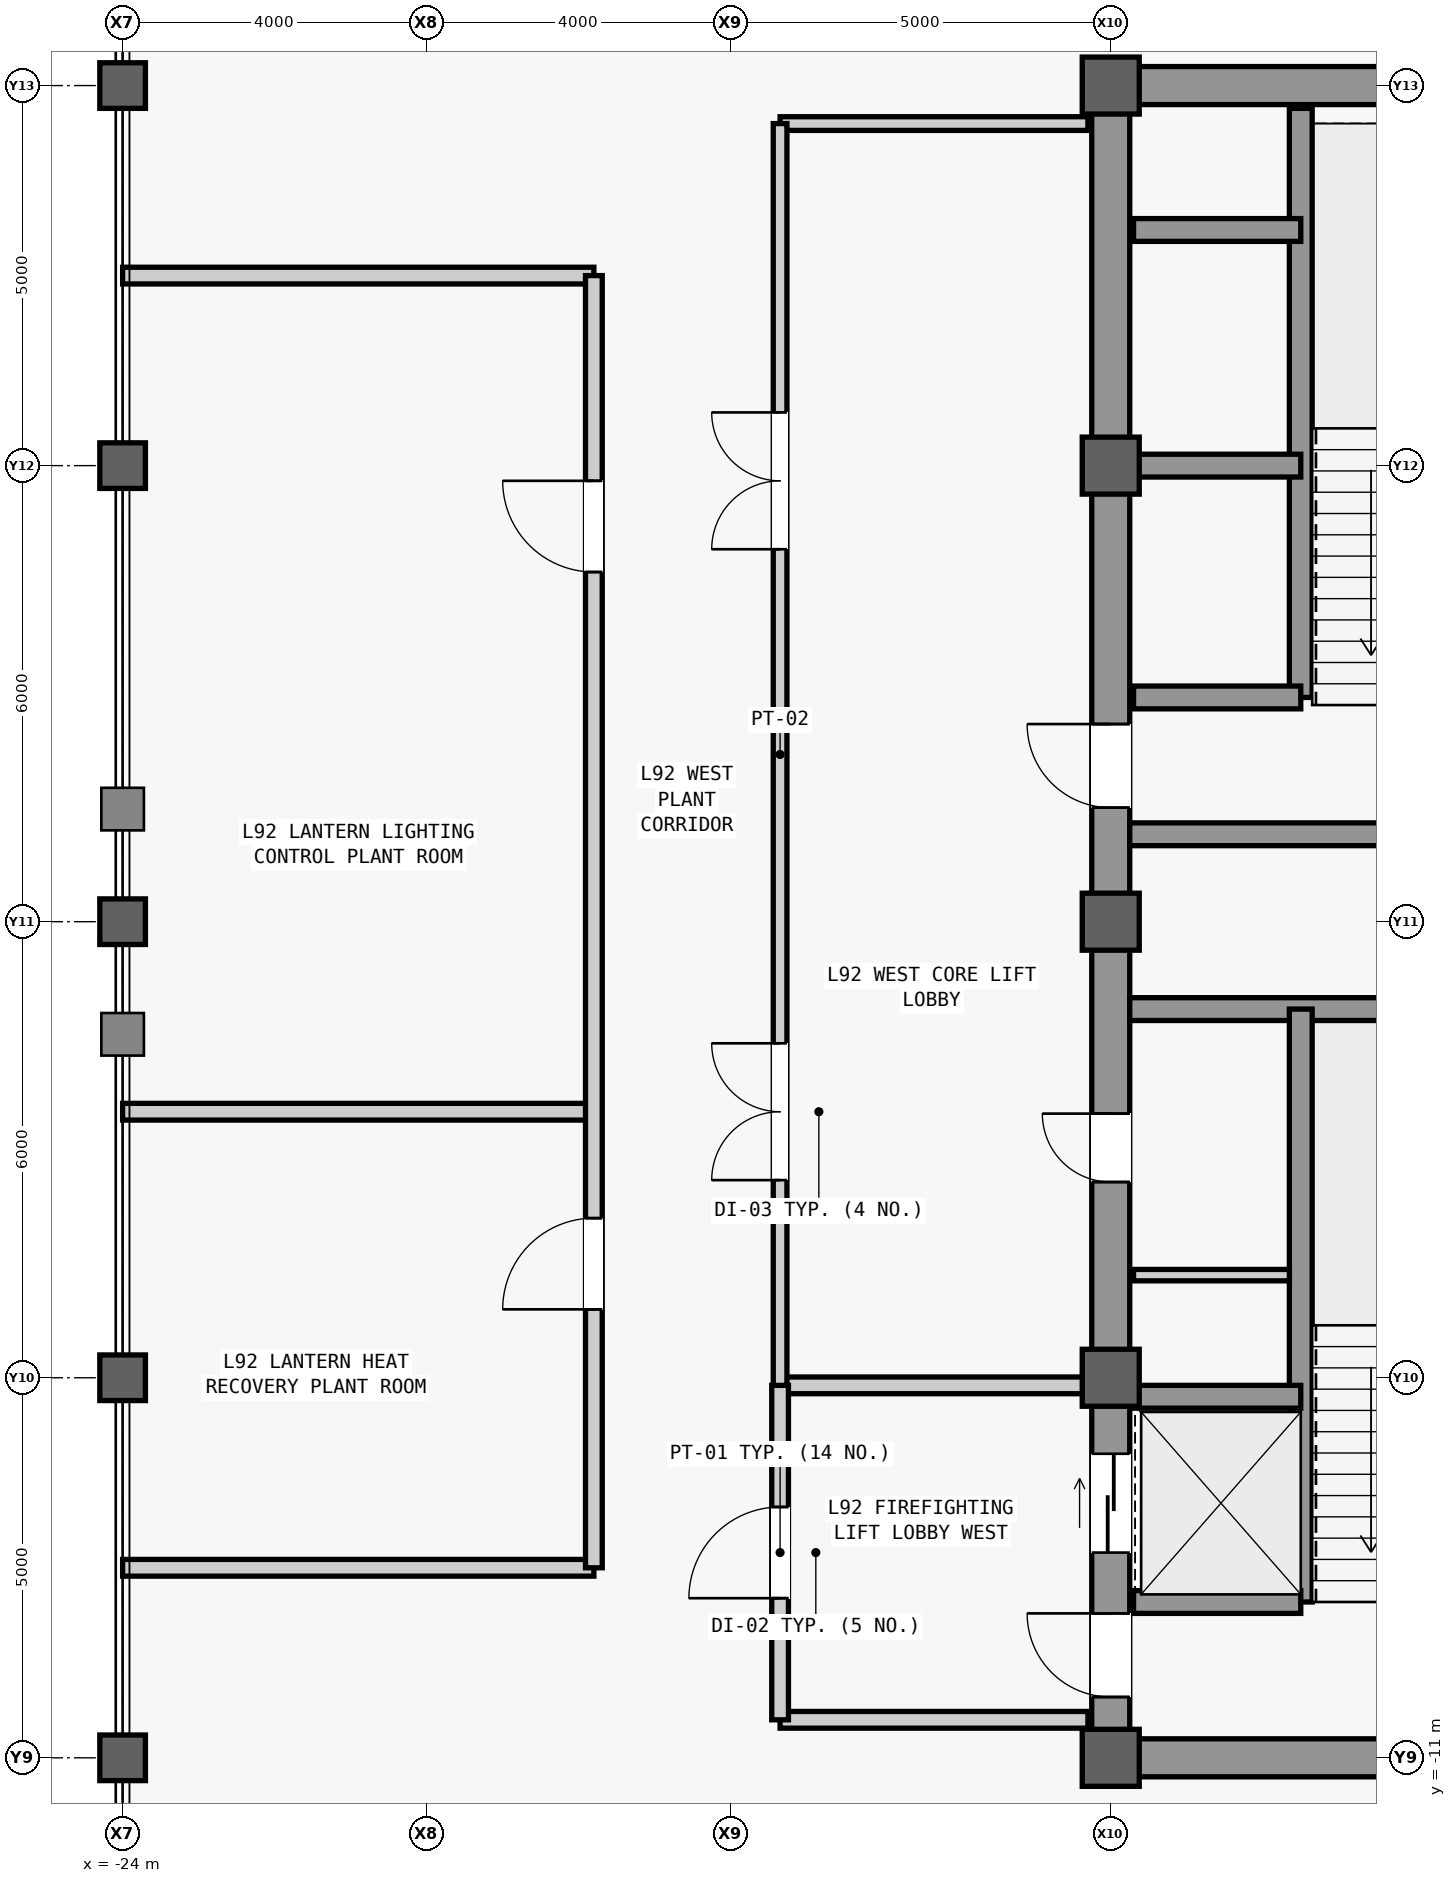
"""IFC4 building model, lengths in metres.
Left out: names, types, materials, properties, quantities, classifications, styles, units other than length and angle.
Written with IfcOpenShell. Run it as: python <this file> out.ifc"""

import sys

from ifc_helpers import new_model, si_unit, direction, frame, frame_2d, origin, origin_2d, place, context, subcontext, project, spatial, rectangle, hollow_rectangle, extrude, source, transform, mapped, element, fill, save


model = new_model("IFC4")
c1 = context("Model", 3, precision=1e-05, world=origin(), true_north=direction((0.0, 1.0)))
c2 = subcontext(c1, "Body", "Model", "MODEL_VIEW")
j1 = project(units=[si_unit("LENGTHUNIT", "METRE"), si_unit("PLANEANGLEUNIT", "RADIAN")], contexts=[c1])
p1 = place(None, origin())
s1 = spatial("IfcSite", under=j1, at=p1, CompositionType="ELEMENT")
p2 = place(p1, origin())
s2 = spatial("IfcBuilding", under=s1, at=p2, CompositionType="ELEMENT")
p3 = place(p2, frame((0.0, 0.0, 389.9)))
s3 = spatial("IfcBuildingStorey", under=s2, at=p3, CompositionType="ELEMENT", Elevation=389.9)
m1 = source(origin(), c2, "Body", "SweptSolid", [
    extrude(rectangle(XDim=22.0, YDim=0.5, at=frame_2d((11.0, 0.0))), origin(), (0.0, 0.0, 1.0), 4.45),
])
p4 = place(p3, frame((-11.0, -11.0, 0.0), z_axis=(0.0, 0.0, 1.0), x_axis=(0.0, 1.0, 0.0)))
e1 = element("IfcWall", 1, at=p4, inside=s3, PredefinedType="SHEAR", context=c2, shape_type="MappedRepresentation", body=[
    mapped(m1, transform((0.0, 0.0, 0.0), scale=1.0)),
])
m2 = source(origin(), c2, "Body", "SweptSolid", [
    extrude(rectangle(XDim=1.1, YDim=2.2, at=frame_2d((0.55, 1.1))), frame((0.0, 0.26, 0.0), z_axis=(0.0, -1.0, 0.0), x_axis=(1.0, 0.0, 0.0)), (0.0, 0.0, 1.0), 0.52),
])
p5 = place(p4, frame((0.8, 0.0, 0.0)))
e2 = element("IfcOpeningElement", 2, at=p5, cuts=e1, PredefinedType="OPENING", context=c2, shape_type="MappedRepresentation", body=[
    mapped(m2, transform((0.0, 0.0, 0.0), scale=1.0)),
])
p6 = place(p4, frame((12.5, 0.0, 0.0)))
e3 = element("IfcOpeningElement", 3, at=p6, cuts=e1, PredefinedType="OPENING", context=c2, shape_type="MappedRepresentation", body=[
    mapped(m2, transform((0.0, 0.0, 0.0), scale=1.0)),
])
m3 = source(origin(), c2, "Body", "SweptSolid", [
    extrude(rectangle(XDim=0.9, YDim=2.15, at=frame_2d((0.45, 1.075))), frame((0.0, 0.26, 0.0), z_axis=(0.0, -1.0, 0.0), x_axis=(1.0, 0.0, 0.0)), (0.0, 0.0, 1.0), 0.52),
])
p7 = place(p4, frame((7.575, 0.0, 0.0)))
e4 = element("IfcOpeningElement", 4, at=p7, cuts=e1, PredefinedType="OPENING", context=c2, shape_type="MappedRepresentation", body=[
    mapped(m3, transform((0.0, 0.0, 0.0), scale=1.0)),
])
m4 = source(origin(), c2, "Body", "SweptSolid", [
    extrude(rectangle(XDim=1.3, YDim=2.3, at=frame_2d((0.65, 1.15))), frame((0.0, 0.26, 0.0), z_axis=(0.0, -1.0, 0.0), x_axis=(1.0, 0.0, 0.0)), (0.0, 0.0, 1.0), 0.52),
])
p8 = place(p4, frame((2.7, 0.0, 0.0)))
e5 = element("IfcOpeningElement", 5, at=p8, cuts=e1, PredefinedType="OPENING", context=c2, shape_type="MappedRepresentation", body=[
    mapped(m4, transform((0.0, 0.0, 0.0), scale=1.0)),
])
m5 = source(origin(), c2, "Body", "SweptSolid", [
    extrude(rectangle(XDim=5.9, YDim=0.5, at=frame_2d((2.95, 0.0))), origin(), (0.0, 0.0, 1.0), 4.45),
])
for number, where, z_axis, x_axis in (
    (6, (-10.75, -11.0, 0.0), (0.0, 0.0, 1.0), (1.0, 0.0, 0.0)),
    (7, (-10.75, 11.0, 0.0), (0.0, 0.0, 1.0), (1.0, 0.0, 0.0)),
):
    element("IfcWall", number, at=place(p3, frame(where, z_axis=z_axis, x_axis=x_axis)), inside=s3, PredefinedType="SHEAR", context=c2, shape_type="MappedRepresentation", body=[
        mapped(m5, transform((0.0, 0.0, 0.0), scale=1.0)),
    ])
m6 = source(origin(), c2, "Body", "SweptSolid", [
    extrude(rectangle(XDim=5.65, YDim=0.3, at=frame_2d((2.825, 0.0))), origin(), (0.0, 0.0, 1.0), 4.45),
])
for number, where, z_axis, x_axis in (
    (8, (-10.75, -1.15, 0.0), (0.0, 0.0, 1.0), (1.0, 0.0, 0.0)),
    (9, (-10.75, 1.15, 0.0), (0.0, 0.0, 1.0), (1.0, 0.0, 0.0)),
):
    element("IfcWall", number, at=place(p3, frame(where, z_axis=z_axis, x_axis=x_axis)), inside=s3, PredefinedType="SHEAR", context=c2, shape_type="MappedRepresentation", body=[
        mapped(m6, transform((0.0, 0.0, 0.0), scale=1.0)),
    ])
m7 = source(origin(), c2, "Body", "SweptSolid", [
    extrude(hollow_rectangle(XDim=0.6, YDim=0.6, WallThickness=0.035, at=origin_2d()), origin(), (0.0, 0.0, 1.0), 4.8),
])
for number, where, z_axis, x_axis in (
    (10, (-24.0, -11.0, 0.0), (0.0, 0.0, 1.0), (1.0, 0.0, 0.0)),
    (11, (-24.0, -6.0, 0.0), (0.0, 0.0, 1.0), (1.0, 0.0, 0.0)),
    (12, (-24.0, 0.0, 0.0), (0.0, 0.0, 1.0), (1.0, 0.0, 0.0)),
    (13, (-24.0, 6.0, 0.0), (0.0, 0.0, 1.0), (1.0, 0.0, 0.0)),
    (14, (-24.0, 11.0, 0.0), (0.0, 0.0, 1.0), (1.0, 0.0, 0.0)),
):
    element("IfcColumn", number, at=place(p3, frame(where, z_axis=z_axis, x_axis=x_axis)), inside=s3, PredefinedType="COLUMN", context=c2, shape_type="MappedRepresentation", body=[
        mapped(m7, transform((0.0, 0.0, 0.0), scale=1.0)),
    ])
m8 = source(origin(), c2, "Body", "SweptSolid", [
    extrude(rectangle(XDim=0.75, YDim=0.75, at=origin_2d()), origin(), (0.0, 0.0, 1.0), 4.8),
])
for number, where, z_axis, x_axis in (
    (15, (-11.0, -11.0, 0.0), (0.0, 0.0, 1.0), (1.0, 0.0, 0.0)),
    (16, (-11.0, -6.0, 0.0), (0.0, 0.0, 1.0), (1.0, 0.0, 0.0)),
    (17, (-11.0, 0.0, 0.0), (0.0, 0.0, 1.0), (1.0, 0.0, 0.0)),
    (18, (-11.0, 6.0, 0.0), (0.0, 0.0, 1.0), (1.0, 0.0, 0.0)),
    (19, (-11.0, 11.0, 0.0), (0.0, 0.0, 1.0), (1.0, 0.0, 0.0)),
):
    element("IfcColumn", number, at=place(p3, frame(where, z_axis=z_axis, x_axis=x_axis)), inside=s3, PredefinedType="COLUMN", context=c2, shape_type="MappedRepresentation", body=[
        mapped(m8, transform((0.0, 0.0, 0.0), scale=1.0)),
    ])
m9 = source(origin(), c2, "Body", "SweptSolid", [
    extrude(rectangle(XDim=7.8, YDim=0.3, at=frame_2d((3.9, 0.0))), origin(), (0.0, 0.0, 1.0), 4.45),
])
p9 = place(p3, frame((-8.5, -8.95, 0.0), z_axis=(0.0, 0.0, 1.0), x_axis=(0.0, 1.0, 0.0)))
e20 = element("IfcWall", 20, at=p9, inside=s3, PredefinedType="SHEAR", context=c2, shape_type="MappedRepresentation", body=[
    mapped(m9, transform((0.0, 0.0, 0.0), scale=1.0)),
])
m10 = source(origin(), c2, "Body", "SweptSolid", [
    extrude(rectangle(XDim=2.2, YDim=0.3, at=frame_2d((1.1, 0.0))), origin(), (0.0, 0.0, 1.0), 4.45),
])
for number, where, z_axis, x_axis in (
    (21, (-10.7, -8.95, 0.0), (0.0, 0.0, 1.0), (1.0, 0.0, 0.0)),
    (22, (-10.7, -6.25, 0.0), (0.0, 0.0, 1.0), (1.0, 0.0, 0.0)),
):
    element("IfcWall", number, at=place(p3, frame(where, z_axis=z_axis, x_axis=x_axis)), inside=s3, PredefinedType="SHEAR", context=c2, shape_type="MappedRepresentation", body=[
        mapped(m10, transform((0.0, 0.0, 0.0), scale=1.0)),
    ])
m11 = source(origin(), c2, "Body", "SweptSolid", [
    extrude(rectangle(XDim=7.75, YDim=0.3, at=frame_2d((3.875, 0.0))), origin(), (0.0, 0.0, 1.0), 4.45),
])
p10 = place(p3, frame((-8.5, 2.95, 0.0), z_axis=(0.0, 0.0, 1.0), x_axis=(0.0, 1.0, 0.0)))
e23 = element("IfcWall", 23, at=p10, inside=s3, PredefinedType="SHEAR", context=c2, shape_type="MappedRepresentation", body=[
    mapped(m11, transform((0.0, 0.0, 0.0), scale=1.0)),
])
for number, where, z_axis, x_axis in (
    (24, (-10.7, 2.95, 0.0), (0.0, 0.0, 1.0), (1.0, 0.0, 0.0)),
    (25, (-10.7, 6.0, 0.0), (0.0, 0.0, 1.0), (1.0, 0.0, 0.0)),
    (26, (-10.7, 9.1, 0.0), (0.0, 0.0, 1.0), (1.0, 0.0, 0.0)),
):
    element("IfcWall", number, at=place(p3, frame(where, z_axis=z_axis, x_axis=x_axis)), inside=s3, PredefinedType="SHEAR", context=c2, shape_type="MappedRepresentation", body=[
        mapped(m10, transform((0.0, 0.0, 0.0), scale=1.0)),
    ])
m12 = source(origin(), c2, "Body", "SweptSolid", [
    extrude(rectangle(XDim=2.05, YDim=0.15, at=frame_2d((1.025, 0.0))), origin(), (0.0, 0.0, 1.0), 4.45),
])
p11 = place(p3, frame((-10.7, -4.65, 0.0), z_axis=(0.0, 0.0, 1.0), x_axis=(1.0, 0.0, 0.0)))
e27 = element("IfcWall", 27, at=p11, inside=s3, PredefinedType="PARTITIONING", context=c2, shape_type="MappedRepresentation", body=[
    mapped(m12, transform((0.0, 0.0, 0.0), scale=1.0)),
])
m13 = source(origin(), c2, "Body", "SweptSolid", [
    extrude(rectangle(XDim=4.05, YDim=0.22, at=frame_2d((2.025, 0.0))), origin(), (0.0, 0.0, 1.0), 4.45),
])
p12 = place(p3, frame((-15.35, -10.5, 0.0), z_axis=(0.0, 0.0, 1.0), x_axis=(1.0, 0.0, 0.0)))
e28 = element("IfcWall", 28, at=p12, inside=s3, PredefinedType="PARTITIONING", context=c2, shape_type="MappedRepresentation", body=[
    mapped(m13, transform((0.0, 0.0, 0.0), scale=1.0)),
])
m14 = source(origin(), c2, "Body", "SweptSolid", [
    extrude(rectangle(XDim=4.05, YDim=0.22, at=frame_2d((2.025, 0.0))), origin(), (0.0, 0.0, 1.0), 3.901),
])
p13 = place(p3, frame((-15.35, -6.1, 0.0), z_axis=(0.0, 0.0, 1.0), x_axis=(1.0, 0.0, 0.0)))
e29 = element("IfcWall", 29, at=p13, inside=s3, PredefinedType="PARTITIONING", context=c2, shape_type="MappedRepresentation", body=[
    mapped(m14, transform((0.0, 0.0, 0.0), scale=1.0)),
])
m15 = source(origin(), c2, "Body", "SweptSolid", [
    extrude(rectangle(XDim=4.4, YDim=0.22, at=frame_2d((2.2, 0.0))), origin(), (0.0, 0.0, 1.0), 4.45),
])
p14 = place(p3, frame((-15.35, -10.5, 0.0), z_axis=(0.0, 0.0, 1.0), x_axis=(0.0, 1.0, 0.0)))
e30 = element("IfcWall", 30, at=p14, inside=s3, PredefinedType="PARTITIONING", context=c2, shape_type="MappedRepresentation", body=[
    mapped(m15, transform((0.0, 0.0, 0.0), scale=1.0)),
])
m16 = source(origin(), c2, "Body", "SweptSolid", [
    extrude(rectangle(XDim=1.2, YDim=2.2, at=frame_2d((0.6, 1.1))), frame((0.0, 0.12, 0.0), z_axis=(0.0, -1.0, 0.0), x_axis=(1.0, 0.0, 0.0)), (0.0, 0.0, 1.0), 0.24),
])
p15 = place(p14, frame((1.6, 0.0, 0.0)))
e31 = element("IfcOpeningElement", 31, at=p15, cuts=e30, PredefinedType="OPENING", context=c2, shape_type="MappedRepresentation", body=[
    mapped(m16, transform((0.0, 0.0, 0.0), scale=1.0)),
])
m17 = source(origin(), c2, "Body", "SweptSolid", [
    extrude(rectangle(XDim=4.05, YDim=0.18, at=frame_2d((2.025, 0.0))), origin(), (0.0, 0.0, 1.0), 4.45),
])
p16 = place(p3, frame((-15.35, 10.5, 0.0), z_axis=(0.0, 0.0, 1.0), x_axis=(1.0, 0.0, 0.0)))
e32 = element("IfcWall", 32, at=p16, inside=s3, PredefinedType="PARTITIONING", context=c2, shape_type="MappedRepresentation", body=[
    mapped(m17, transform((0.0, 0.0, 0.0), scale=1.0)),
])
m18 = source(origin(), c2, "Body", "SweptSolid", [
    extrude(rectangle(XDim=16.6, YDim=0.18, at=frame_2d((8.3, 0.0))), origin(), (0.0, 0.0, 1.0), 4.45),
])
p17 = place(p3, frame((-15.35, -6.1, 0.0), z_axis=(0.0, 0.0, 1.0), x_axis=(0.0, 1.0, 0.0)))
e33 = element("IfcWall", 33, at=p17, inside=s3, PredefinedType="PARTITIONING", context=c2, shape_type="MappedRepresentation", body=[
    mapped(m18, transform((0.0, 0.0, 0.0), scale=1.0)),
])
m19 = source(origin(), c2, "Body", "SweptSolid", [
    extrude(rectangle(XDim=1.8, YDim=2.25, at=frame_2d((0.9, 1.125))), frame((0.0, 0.1, 0.0), z_axis=(0.0, -1.0, 0.0), x_axis=(1.0, 0.0, 0.0)), (0.0, 0.0, 1.0), 0.2),
])
p18 = place(p17, frame((2.7, 0.0, 0.0)))
e34 = element("IfcOpeningElement", 34, at=p18, cuts=e33, PredefinedType="OPENING", context=c2, shape_type="MappedRepresentation", body=[
    mapped(m19, transform((0.0, 0.0, 0.0), scale=1.0)),
])
p19 = place(p17, frame((11.0, 0.0, 0.0)))
e35 = element("IfcOpeningElement", 35, at=p19, cuts=e33, PredefinedType="OPENING", context=c2, shape_type="MappedRepresentation", body=[
    mapped(m19, transform((0.0, 0.0, 0.0), scale=1.0)),
])
m20 = source(origin(), c2, "Body", "SweptSolid", [
    extrude(rectangle(XDim=6.2, YDim=0.22, at=frame_2d((3.1, 0.0))), origin(), (0.0, 0.0, 1.0), 4.45),
])
for number, where, z_axis, x_axis in (
    (36, (-24.0, -2.5, 0.0), (0.0, 0.0, 1.0), (1.0, 0.0, 0.0)),
    (37, (-24.0, -8.5, 0.0), (0.0, 0.0, 1.0), (1.0, 0.0, 0.0)),
    (38, (-24.0, 8.5, 0.0), (0.0, 0.0, 1.0), (1.0, 0.0, 0.0)),
):
    element("IfcWall", number, at=place(p3, frame(where, z_axis=z_axis, x_axis=x_axis)), inside=s3, PredefinedType="PARTITIONING", context=c2, shape_type="MappedRepresentation", body=[
        mapped(m20, transform((0.0, 0.0, 0.0), scale=1.0)),
    ])
m21 = source(origin(), c2, "Body", "SweptSolid", [
    extrude(rectangle(XDim=17.0, YDim=0.22, at=frame_2d((8.5, 0.0))), origin(), (0.0, 0.0, 1.0), 4.45),
])
p20 = place(p3, frame((-17.8, -8.5, 0.0), z_axis=(0.0, 0.0, 1.0), x_axis=(0.0, 1.0, 0.0)))
e39 = element("IfcWall", 39, at=p20, inside=s3, PredefinedType="PARTITIONING", context=c2, shape_type="MappedRepresentation", body=[
    mapped(m21, transform((0.0, 0.0, 0.0), scale=1.0)),
])
p21 = place(p20, frame((3.4, 0.0, 0.0)))
e40 = element("IfcOpeningElement", 40, at=p21, cuts=e39, PredefinedType="OPENING", context=c2, shape_type="MappedRepresentation", body=[
    mapped(m16, transform((0.0, 0.0, 0.0), scale=1.0)),
])
p22 = place(p20, frame((13.1, 0.0, 0.0)))
e41 = element("IfcOpeningElement", 41, at=p22, cuts=e39, PredefinedType="OPENING", context=c2, shape_type="MappedRepresentation", body=[
    mapped(m16, transform((0.0, 0.0, 0.0), scale=1.0)),
])
m22 = source(origin(), c2, "Body", "SweptSolid", [
    extrude(rectangle(XDim=1.1, YDim=2.2, at=frame_2d((0.55, 1.1))), frame((0.0, 0.025, 0.0), z_axis=(0.0, -1.0, 0.0), x_axis=(1.0, 0.0, 0.0)), (0.0, 0.0, 1.0), 0.05),
])
p23 = place(p5, origin())
e42 = element("IfcDoor", 42, at=p23, inside=s3, OperationType="SINGLE_SWING_RIGHT", PredefinedType="DOOR", context=c2, shape_type="MappedRepresentation", body=[
    mapped(m22, transform((0.0, 0.0, 0.0), scale=1.0)),
])
fill(e2, e42)
p24 = place(p6, origin())
e43 = element("IfcDoor", 43, at=p24, inside=s3, OperationType="SINGLE_SWING_RIGHT", PredefinedType="DOOR", context=c2, shape_type="MappedRepresentation", body=[
    mapped(m22, transform((0.0, 0.0, 0.0), scale=1.0)),
])
fill(e3, e43)
m23 = source(origin(), c2, "Body", "SweptSolid", [
    extrude(rectangle(XDim=0.9, YDim=2.15, at=frame_2d((0.45, 1.075))), frame((0.0, 0.025, 0.0), z_axis=(0.0, -1.0, 0.0), x_axis=(1.0, 0.0, 0.0)), (0.0, 0.0, 1.0), 0.05),
])
p25 = place(p7, origin())
e44 = element("IfcDoor", 44, at=p25, inside=s3, OperationType="SINGLE_SWING_RIGHT", PredefinedType="DOOR", context=c2, shape_type="MappedRepresentation", body=[
    mapped(m23, transform((0.0, 0.0, 0.0), scale=1.0)),
])
fill(e4, e44)
m24 = source(origin(), c2, "Body", "SweptSolid", [
    extrude(rectangle(XDim=1.2, YDim=2.2, at=frame_2d((0.6, 1.1))), frame((0.0, 0.025, 0.0), z_axis=(0.0, -1.0, 0.0), x_axis=(1.0, 0.0, 0.0)), (0.0, 0.0, 1.0), 0.05),
])
p26 = place(p15, origin())
e45 = element("IfcDoor", 45, at=p26, inside=s3, OperationType="SINGLE_SWING_LEFT", PredefinedType="DOOR", context=c2, shape_type="MappedRepresentation", body=[
    mapped(m24, transform((0.0, 0.0, 0.0), scale=1.0)),
])
fill(e31, e45)
m25 = source(origin(), c2, "Body", "SweptSolid", [
    extrude(rectangle(XDim=1.8, YDim=2.25, at=frame_2d((0.9, 1.125))), frame((0.0, 0.025, 0.0), z_axis=(0.0, -1.0, 0.0), x_axis=(1.0, 0.0, 0.0)), (0.0, 0.0, 1.0), 0.05),
])
p27 = place(p18, origin())
e46 = element("IfcDoor", 46, at=p27, inside=s3, OperationType="SINGLE_SWING_LEFT", PredefinedType="DOOR", context=c2, shape_type="MappedRepresentation", body=[
    mapped(m25, transform((0.0, 0.0, 0.0), scale=1.0)),
])
fill(e34, e46)
p28 = place(p19, origin())
e47 = element("IfcDoor", 47, at=p28, inside=s3, OperationType="SINGLE_SWING_RIGHT", PredefinedType="DOOR", context=c2, shape_type="MappedRepresentation", body=[
    mapped(m25, transform((0.0, 0.0, 0.0), scale=1.0)),
])
fill(e35, e47)
p29 = place(p21, origin())
e48 = element("IfcDoor", 48, at=p29, inside=s3, OperationType="SINGLE_SWING_LEFT", PredefinedType="DOOR", context=c2, shape_type="MappedRepresentation", body=[
    mapped(m24, transform((0.0, 0.0, 0.0), scale=1.0)),
])
fill(e40, e48)
p30 = place(p22, origin())
e49 = element("IfcDoor", 49, at=p30, inside=s3, OperationType="SINGLE_SWING_RIGHT", PredefinedType="DOOR", context=c2, shape_type="MappedRepresentation", body=[
    mapped(m24, transform((0.0, 0.0, 0.0), scale=1.0)),
])
fill(e41, e49)
m26 = source(origin(), c2, "Body", "SweptSolid", [
    extrude(rectangle(XDim=1.3, YDim=2.3, at=frame_2d((0.65, 1.15))), frame((0.0, 0.025, 0.0), z_axis=(0.0, -1.0, 0.0), x_axis=(1.0, 0.0, 0.0)), (0.0, 0.0, 1.0), 0.05),
])
p31 = place(p8, origin())
e50 = element("IfcDoor", 50, at=p31, inside=s3, OperationType="SLIDING_TO_LEFT", PredefinedType="DOOR", context=c2, shape_type="MappedRepresentation", body=[
    mapped(m26, transform((0.0, 0.0, 0.0), scale=1.0)),
])
fill(e5, e50)
save(model, sys.argv[1])
